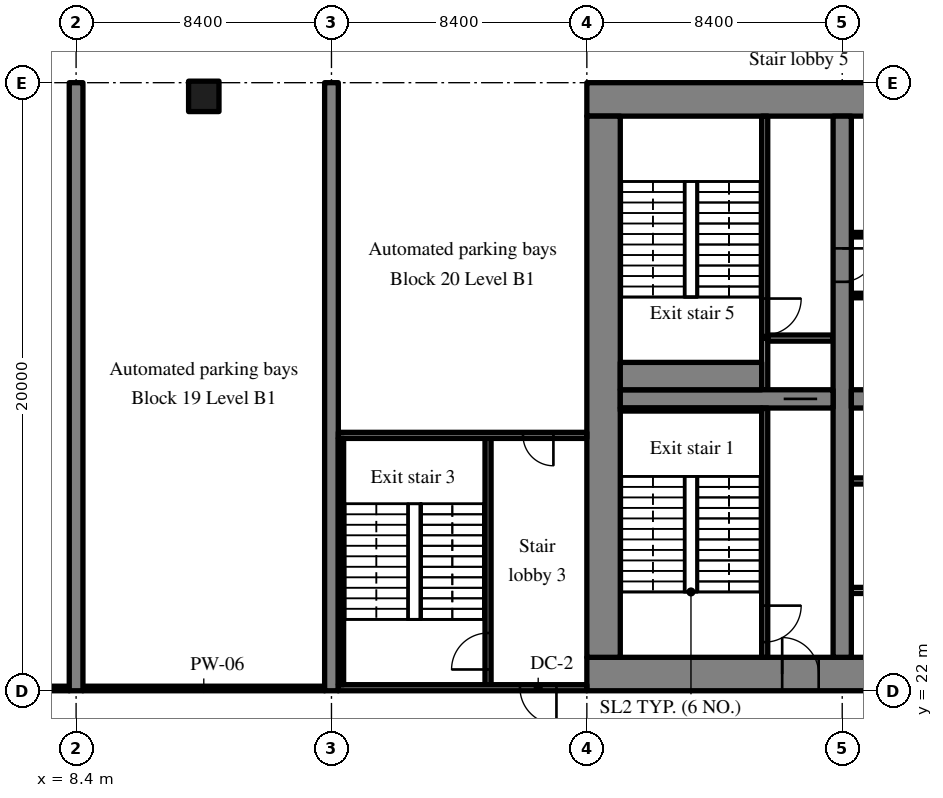
"""IFC4 building model, lengths in metres.
Left out: names, types, materials, properties, quantities, classifications, styles, units other than length and angle.
Written with IfcOpenShell. Run it as: python <this file> out.ifc"""

import sys

from ifc_helpers import new_model, si_unit, direction, frame, frame_2d, origin, origin_2d, place, context, subcontext, project, spatial, rectangle, extrude, source, transform, mapped, element, fill, save


model = new_model("IFC4")
c1 = context("Model", 3, precision=1e-05, world=origin(), true_north=direction((0.0, 1.0)))
c2 = subcontext(c1, "Body", "Model", "MODEL_VIEW")
j1 = project(units=[si_unit("LENGTHUNIT", "METRE"), si_unit("PLANEANGLEUNIT", "RADIAN")], contexts=[c1])
p1 = place(None, origin())
s1 = spatial("IfcSite", under=j1, at=p1, CompositionType="ELEMENT")
p2 = place(p1, origin())
s2 = spatial("IfcBuilding", under=s1, at=p2, CompositionType="ELEMENT")
p3 = place(p2, frame((0.0, 0.0, -4.5)))
s3 = spatial("IfcBuildingStorey", under=s2, at=p3, CompositionType="ELEMENT", Elevation=-4.5)
m1 = source(origin(), c2, "Body", "SweptSolid", [
    extrude(rectangle(XDim=50.4, YDim=1.1, at=frame_2d((25.2, 0.0))), origin(), (0.0, 0.0, 1.0), 4.22),
])
p4 = place(p3, frame((25.2, 22.55, 0.0), z_axis=(0.0, 0.0, 1.0), x_axis=(1.0, 0.0, 0.0)))
e1 = element("IfcWall", 1, at=p4, inside=s3, PredefinedType="SHEAR", context=c2, shape_type="MappedRepresentation", body=[
    mapped(m1, transform((0.0, 0.0, 0.0), scale=1.0)),
])
m2 = source(origin(), c2, "Body", "SweptSolid", [
    extrude(rectangle(XDim=1.8, YDim=2.1, at=frame_2d((0.9, 1.05))), frame((0.0, 0.56, 0.0), z_axis=(0.0, -1.0, 0.0), x_axis=(1.0, 0.0, 0.0)), (0.0, 0.0, 1.0), 1.12),
])
p5 = place(p4, frame((15.9, 0.0, 0.0)))
e2 = element("IfcOpeningElement", 2, at=p5, cuts=e1, PredefinedType="OPENING", context=c2, shape_type="MappedRepresentation", body=[
    mapped(m2, transform((0.0, 0.0, 0.0), scale=1.0)),
])
m3 = source(origin(), c2, "Body", "SweptSolid", [
    extrude(rectangle(XDim=1.2, YDim=2.1, at=frame_2d((0.6, 1.05))), frame((0.0, 0.56, 0.0), z_axis=(0.0, -1.0, 0.0), x_axis=(1.0, 0.0, 0.0)), (0.0, 0.0, 1.0), 1.12),
])
p6 = place(p4, frame((27.0, 0.0, 0.0)))
e3 = element("IfcOpeningElement", 3, at=p6, cuts=e1, PredefinedType="OPENING", context=c2, shape_type="MappedRepresentation", body=[
    mapped(m3, transform((0.0, 0.0, 0.0), scale=1.0)),
])
m4 = source(origin(), c2, "Body", "SweptSolid", [
    extrude(rectangle(XDim=0.9, YDim=2.1, at=frame_2d((0.45, 1.05))), frame((0.0, 0.56, 0.0), z_axis=(0.0, -1.0, 0.0), x_axis=(1.0, 0.0, 0.0)), (0.0, 0.0, 1.0), 1.12),
])
p7 = place(p4, frame((34.5, 0.0, 0.0)))
e4 = element("IfcOpeningElement", 4, at=p7, cuts=e1, PredefinedType="OPENING", context=c2, shape_type="MappedRepresentation", body=[
    mapped(m4, transform((0.0, 0.0, 0.0), scale=1.0)),
])
p8 = place(p4, frame((31.5, 0.0, 0.0)))
e5 = element("IfcOpeningElement", 5, at=p8, cuts=e1, PredefinedType="OPENING", context=c2, shape_type="MappedRepresentation", body=[
    mapped(m4, transform((0.0, 0.0, 0.0), scale=1.0)),
])
p9 = place(p4, frame((39.75, 0.0, 0.0)))
e6 = element("IfcOpeningElement", 6, at=p9, cuts=e1, PredefinedType="OPENING", context=c2, shape_type="MappedRepresentation", body=[
    mapped(m4, transform((0.0, 0.0, 0.0), scale=1.0)),
])
p10 = place(p4, frame((36.75, 0.0, 0.0)))
e7 = element("IfcOpeningElement", 7, at=p10, cuts=e1, PredefinedType="OPENING", context=c2, shape_type="MappedRepresentation", body=[
    mapped(m4, transform((0.0, 0.0, 0.0), scale=1.0)),
])
p11 = place(p4, frame((6.425, 0.0, 0.0)))
e8 = element("IfcOpeningElement", 8, at=p11, cuts=e1, PredefinedType="OPENING", context=c2, shape_type="MappedRepresentation", body=[
    mapped(m3, transform((0.0, 0.0, 0.0), scale=1.0)),
])
p12 = place(p4, frame((47.675, 0.0, 0.0)))
e9 = element("IfcOpeningElement", 9, at=p12, cuts=e1, PredefinedType="OPENING", context=c2, shape_type="MappedRepresentation", body=[
    mapped(m3, transform((0.0, 0.0, 0.0), scale=1.0)),
])
p13 = place(p3, frame((25.2, 41.45, 0.0), z_axis=(0.0, 0.0, 1.0), x_axis=(1.0, 0.0, 0.0)))
e10 = element("IfcWall", 10, at=p13, inside=s3, PredefinedType="SHEAR", context=c2, shape_type="MappedRepresentation", body=[
    mapped(m1, transform((0.0, 0.0, 0.0), scale=1.0)),
])
m5 = source(origin(), c2, "Body", "SweptSolid", [
    extrude(rectangle(XDim=17.8, YDim=1.1, at=frame_2d((8.9, 0.0))), origin(), (0.0, 0.0, 1.0), 4.22),
])
p14 = place(p3, frame((25.75, 23.1, 0.0), z_axis=(0.0, 0.0, 1.0), x_axis=(0.0, 1.0, 0.0)))
e11 = element("IfcWall", 11, at=p14, inside=s3, PredefinedType="SHEAR", context=c2, shape_type="MappedRepresentation", body=[
    mapped(m5, transform((0.0, 0.0, 0.0), scale=1.0)),
])
m6 = source(origin(), c2, "Body", "SweptSolid", [
    extrude(rectangle(XDim=17.8, YDim=0.6, at=frame_2d((8.9, 0.0))), origin(), (0.0, 0.0, 1.0), 4.22),
])
p15 = place(p3, frame((33.6, 23.1, 0.0), z_axis=(0.0, 0.0, 1.0), x_axis=(0.0, 1.0, 0.0)))
e12 = element("IfcWall", 12, at=p15, inside=s3, PredefinedType="SHEAR", context=c2, shape_type="MappedRepresentation", body=[
    mapped(m6, transform((0.0, 0.0, 0.0), scale=1.0)),
])
m7 = source(origin(), c2, "Body", "SweptSolid", [
    extrude(rectangle(XDim=1.1, YDim=2.1, at=frame_2d((0.55, 1.05))), frame((0.0, 0.31, 0.0), z_axis=(0.0, -1.0, 0.0), x_axis=(1.0, 0.0, 0.0)), (0.0, 0.0, 1.0), 0.62),
])
p16 = place(p15, frame((12.35, 0.0, 0.0)))
e13 = element("IfcOpeningElement", 13, at=p16, cuts=e12, PredefinedType="OPENING", context=c2, shape_type="MappedRepresentation", body=[
    mapped(m7, transform((0.0, 0.0, 0.0), scale=1.0)),
])
m8 = source(origin(), c2, "Body", "SweptSolid", [
    extrude(rectangle(XDim=7.0, YDim=0.6, at=frame_2d((3.5, 0.0))), origin(), (0.0, 0.0, 1.0), 4.22),
])
p17 = place(p3, frame((26.3, 31.6, 0.0), z_axis=(0.0, 0.0, 1.0), x_axis=(1.0, 0.0, 0.0)))
e14 = element("IfcWall", 14, at=p17, inside=s3, PredefinedType="SHEAR", context=c2, shape_type="MappedRepresentation", body=[
    mapped(m8, transform((0.0, 0.0, 0.0), scale=1.0)),
])
p18 = place(p17, frame((5.375, 0.0, 0.0)))
e15 = element("IfcOpeningElement", 15, at=p18, cuts=e14, PredefinedType="OPENING", context=c2, shape_type="MappedRepresentation", body=[
    mapped(m7, transform((0.0, 0.0, 0.0), scale=1.0)),
])
m9 = source(origin(), c2, "Body", "SweptSolid", [
    extrude(rectangle(XDim=16.2, YDim=0.6, at=frame_2d((8.1, 0.0))), origin(), (0.0, 0.0, 1.0), 4.22),
])
p19 = place(p3, frame((33.9, 31.6, 0.0), z_axis=(0.0, 0.0, 1.0), x_axis=(1.0, 0.0, 0.0)))
e16 = element("IfcWall", 16, at=p19, inside=s3, PredefinedType="SHEAR", context=c2, shape_type="MappedRepresentation", body=[
    mapped(m9, transform((0.0, 0.0, 0.0), scale=1.0)),
])
m10 = source(origin(), c2, "Body", "SweptSolid", [
    extrude(rectangle(XDim=1.0, YDim=2.1, at=frame_2d((0.5, 1.05))), frame((0.0, 0.31, 0.0), z_axis=(0.0, -1.0, 0.0), x_axis=(1.0, 0.0, 0.0)), (0.0, 0.0, 1.0), 0.62),
])
p20 = place(p19, frame((14.65, 0.0, 0.0)))
e17 = element("IfcOpeningElement", 17, at=p20, cuts=e16, PredefinedType="OPENING", context=c2, shape_type="MappedRepresentation", body=[
    mapped(m10, transform((0.0, 0.0, 0.0), scale=1.0)),
])
m11 = source(origin(), c2, "Body", "SweptSolid", [
    extrude(rectangle(XDim=20.0, YDim=0.45, at=frame_2d((10.0, 0.0))), origin(), (0.0, 0.0, 1.0), 4.22),
])
for number, where, z_axis, x_axis in (
    (18, (8.4, 22.0, 0.0), (0.0, 0.0, 1.0), (0.0, 1.0, 0.0)),
    (19, (16.8, 22.0, 0.0), (0.0, 0.0, 1.0), (0.0, 1.0, 0.0)),
):
    element("IfcWall", number, at=place(p3, frame(where, z_axis=z_axis, x_axis=x_axis)), inside=s3, PredefinedType="SHEAR", context=c2, shape_type="MappedRepresentation", body=[
        mapped(m11, transform((0.0, 0.0, 0.0), scale=1.0)),
    ])
m12 = source(origin(), c2, "Body", "SweptSolid", [
    extrude(rectangle(XDim=1.0, YDim=1.0, at=origin_2d()), origin(), (0.0, 0.0, 1.0), 4.22),
])
p21 = place(p3, frame((12.6, 41.55, 0.0), z_axis=(0.0, 0.0, 1.0), x_axis=(1.0, 0.0, 0.0)))
e20 = element("IfcColumn", 20, at=p21, inside=s3, PredefinedType="COLUMN", context=c2, shape_type="MappedRepresentation", body=[
    mapped(m12, transform((0.0, 0.0, 0.0), scale=1.0)),
])
m13 = source(origin(), c2, "Body", "SweptSolid", [
    extrude(rectangle(XDim=6.0, YDim=0.2, at=frame_2d((3.0, 0.0))), origin(), (0.0, 0.0, 1.0), 4.22),
])
p22 = place(p3, frame((33.9, 25.3, 0.0), z_axis=(0.0, 0.0, 1.0), x_axis=(1.0, 0.0, 0.0)))
e21 = element("IfcWall", 21, at=p22, inside=s3, PredefinedType="SOLIDWALL", context=c2, shape_type="MappedRepresentation", body=[
    mapped(m13, transform((0.0, 0.0, 0.0), scale=1.0)),
])
m14 = source(origin(), c2, "Body", "SweptSolid", [
    extrude(rectangle(XDim=1.1, YDim=2.1, at=frame_2d((0.55, 1.05))), frame((0.0, 0.11, 0.0), z_axis=(0.0, -1.0, 0.0), x_axis=(1.0, 0.0, 0.0)), (0.0, 0.0, 1.0), 0.22),
])
p23 = place(p22, frame((0.95, 0.0, 0.0)))
e22 = element("IfcOpeningElement", 22, at=p23, cuts=e21, PredefinedType="OPENING", context=c2, shape_type="MappedRepresentation", body=[
    mapped(m14, transform((0.0, 0.0, 0.0), scale=1.0)),
])
p24 = place(p22, frame((3.95, 0.0, 0.0)))
e23 = element("IfcOpeningElement", 23, at=p24, cuts=e21, PredefinedType="OPENING", context=c2, shape_type="MappedRepresentation", body=[
    mapped(m14, transform((0.0, 0.0, 0.0), scale=1.0)),
])
m15 = source(origin(), c2, "Body", "SweptSolid", [
    extrude(rectangle(XDim=12.0, YDim=0.2, at=frame_2d((6.0, 0.0))), origin(), (0.0, 0.0, 1.0), 4.22),
])
p25 = place(p3, frame((33.9, 28.9, 0.0), z_axis=(0.0, 0.0, 1.0), x_axis=(1.0, 0.0, 0.0)))
e24 = element("IfcWall", 24, at=p25, inside=s3, PredefinedType="SOLIDWALL", context=c2, shape_type="MappedRepresentation", body=[
    mapped(m15, transform((0.0, 0.0, 0.0), scale=1.0)),
])
p26 = place(p25, frame((6.95, 0.0, 0.0)))
e25 = element("IfcOpeningElement", 25, at=p26, cuts=e24, PredefinedType="OPENING", context=c2, shape_type="MappedRepresentation", body=[
    mapped(m14, transform((0.0, 0.0, 0.0), scale=1.0)),
])
p27 = place(p25, frame((9.95, 0.0, 0.0)))
e26 = element("IfcOpeningElement", 26, at=p27, cuts=e24, PredefinedType="OPENING", context=c2, shape_type="MappedRepresentation", body=[
    mapped(m14, transform((0.0, 0.0, 0.0), scale=1.0)),
])
m16 = source(origin(), c2, "Body", "SweptSolid", [
    extrude(rectangle(XDim=14.1, YDim=0.15, at=frame_2d((7.05, 0.0))), origin(), (0.0, 0.0, 1.0), 4.22),
])
p28 = place(p3, frame((33.9, 35.0, 0.0), z_axis=(0.0, 0.0, 1.0), x_axis=(1.0, 0.0, 0.0)))
e27 = element("IfcWall", 27, at=p28, inside=s3, PredefinedType="PARTITIONING", context=c2, shape_type="MappedRepresentation", body=[
    mapped(m16, transform((0.0, 0.0, 0.0), scale=1.0)),
])
m17 = source(origin(), c2, "Body", "SweptSolid", [
    extrude(rectangle(XDim=0.9, YDim=2.1, at=frame_2d((0.45, 1.05))), frame((0.0, 0.085, 0.0), z_axis=(0.0, -1.0, 0.0), x_axis=(1.0, 0.0, 0.0)), (0.0, 0.0, 1.0), 0.17),
])
p29 = place(p28, frame((2.004, 0.0, 0.0)))
e28 = element("IfcOpeningElement", 28, at=p29, cuts=e27, PredefinedType="OPENING", context=c2, shape_type="MappedRepresentation", body=[
    mapped(m17, transform((0.0, 0.0, 0.0), scale=1.0)),
])
p30 = place(p28, frame((9.017, 0.0, 0.0)))
e29 = element("IfcOpeningElement", 29, at=p30, cuts=e27, PredefinedType="OPENING", context=c2, shape_type="MappedRepresentation", body=[
    mapped(m17, transform((0.0, 0.0, 0.0), scale=1.0)),
])
m18 = source(origin(), c2, "Body", "SweptSolid", [
    extrude(rectangle(XDim=16.2, YDim=0.15, at=frame_2d((8.1, 0.0))), origin(), (0.0, 0.0, 1.0), 4.22),
])
p31 = place(p3, frame((33.9, 37.0, 0.0), z_axis=(0.0, 0.0, 1.0), x_axis=(1.0, 0.0, 0.0)))
e30 = element("IfcWall", 30, at=p31, inside=s3, PredefinedType="PARTITIONING", context=c2, shape_type="MappedRepresentation", body=[
    mapped(m18, transform((0.0, 0.0, 0.0), scale=1.0)),
])
p32 = place(p31, frame((3.195, 0.0, 0.0)))
e31 = element("IfcOpeningElement", 31, at=p32, cuts=e30, PredefinedType="OPENING", context=c2, shape_type="MappedRepresentation", body=[
    mapped(m17, transform((0.0, 0.0, 0.0), scale=1.0)),
])
p33 = place(p31, frame((8.055, 0.0, 0.0)))
e32 = element("IfcOpeningElement", 32, at=p33, cuts=e30, PredefinedType="OPENING", context=c2, shape_type="MappedRepresentation", body=[
    mapped(m17, transform((0.0, 0.0, 0.0), scale=1.0)),
])
p34 = place(p31, frame((11.295, 0.0, 0.0)))
e33 = element("IfcOpeningElement", 33, at=p34, cuts=e30, PredefinedType="OPENING", context=c2, shape_type="MappedRepresentation", body=[
    mapped(m17, transform((0.0, 0.0, 0.0), scale=1.0)),
])
p35 = place(p31, frame((14.535, 0.0, 0.0)))
e34 = element("IfcOpeningElement", 34, at=p35, cuts=e30, PredefinedType="OPENING", context=c2, shape_type="MappedRepresentation", body=[
    mapped(m17, transform((0.0, 0.0, 0.0), scale=1.0)),
])
m19 = source(origin(), c2, "Body", "SweptSolid", [
    extrude(rectangle(XDim=8.2, YDim=0.2, at=frame_2d((4.1, 0.0))), origin(), (0.0, 0.0, 1.0), 4.22),
])
p36 = place(p3, frame((31.05, 23.1, 0.0), z_axis=(0.0, 0.0, 1.0), x_axis=(0.0, 1.0, 0.0)))
e35 = element("IfcWall", 35, at=p36, inside=s3, PredefinedType="SOLIDWALL", context=c2, shape_type="MappedRepresentation", body=[
    mapped(m19, transform((0.0, 0.0, 0.0), scale=1.0)),
])
m20 = source(origin(), c2, "Body", "SweptSolid", [
    extrude(rectangle(XDim=1.2, YDim=2.1, at=frame_2d((0.6, 1.05))), frame((0.0, 0.11, 0.0), z_axis=(0.0, -1.0, 0.0), x_axis=(1.0, 0.0, 0.0)), (0.0, 0.0, 1.0), 0.22),
])
p37 = place(p36, frame((0.5, 0.0, 0.0)))
e36 = element("IfcOpeningElement", 36, at=p37, cuts=e35, PredefinedType="OPENING", context=c2, shape_type="MappedRepresentation", body=[
    mapped(m20, transform((0.0, 0.0, 0.0), scale=1.0)),
])
m21 = source(origin(), c2, "Body", "SweptSolid", [
    extrude(rectangle(XDim=1.7, YDim=0.2, at=frame_2d((0.85, 0.0))), origin(), (0.0, 0.0, 1.0), 4.22),
])
p38 = place(p3, frame((31.05, 31.9, 0.0), z_axis=(0.0, 0.0, 1.0), x_axis=(0.0, 1.0, 0.0)))
e37 = element("IfcWall", 37, at=p38, inside=s3, PredefinedType="SOLIDWALL", context=c2, shape_type="MappedRepresentation", body=[
    mapped(m21, transform((0.0, 0.0, 0.0), scale=1.0)),
])
m22 = source(origin(), c2, "Body", "SweptSolid", [
    extrude(rectangle(XDim=2.15, YDim=0.2, at=frame_2d((1.075, 0.0))), origin(), (0.0, 0.0, 1.0), 4.22),
])
p39 = place(p3, frame((31.15, 33.6, 0.0), z_axis=(0.0, 0.0, 1.0), x_axis=(1.0, 0.0, 0.0)))
e38 = element("IfcWall", 38, at=p39, inside=s3, PredefinedType="SOLIDWALL", context=c2, shape_type="MappedRepresentation", body=[
    mapped(m22, transform((0.0, 0.0, 0.0), scale=1.0)),
])
m23 = source(origin(), c2, "Body", "SweptSolid", [
    extrude(rectangle(XDim=7.3, YDim=0.2, at=frame_2d((3.65, 0.0))), origin(), (0.0, 0.0, 1.0), 4.22),
])
p40 = place(p3, frame((31.05, 33.6, 0.0), z_axis=(0.0, 0.0, 1.0), x_axis=(0.0, 1.0, 0.0)))
e39 = element("IfcWall", 39, at=p40, inside=s3, PredefinedType="SOLIDWALL", context=c2, shape_type="MappedRepresentation", body=[
    mapped(m23, transform((0.0, 0.0, 0.0), scale=1.0)),
])
p41 = place(p40, frame((0.1, 0.0, 0.0)))
e40 = element("IfcOpeningElement", 40, at=p41, cuts=e39, PredefinedType="OPENING", context=c2, shape_type="MappedRepresentation", body=[
    mapped(m20, transform((0.0, 0.0, 0.0), scale=1.0)),
])
m24 = source(origin(), c2, "Body", "SweptSolid", [
    extrude(rectangle(XDim=8.3, YDim=0.2, at=frame_2d((4.15, 0.0))), origin(), (0.0, 0.0, 1.0), 4.22),
])
p42 = place(p3, frame((21.95, 22.1, 0.0), z_axis=(0.0, 0.0, 1.0), x_axis=(0.0, 1.0, 0.0)))
e41 = element("IfcWall", 41, at=p42, inside=s3, PredefinedType="SOLIDWALL", context=c2, shape_type="MappedRepresentation", body=[
    mapped(m24, transform((0.0, 0.0, 0.0), scale=1.0)),
])
p43 = place(p42, frame((0.6, 0.0, 0.0)))
e42 = element("IfcOpeningElement", 42, at=p43, cuts=e41, PredefinedType="OPENING", context=c2, shape_type="MappedRepresentation", body=[
    mapped(m20, transform((0.0, 0.0, 0.0), scale=1.0)),
])
m25 = source(origin(), c2, "Body", "SweptSolid", [
    extrude(rectangle(XDim=8.175, YDim=0.2, at=frame_2d((4.087, 0.0))), origin(), (0.0, 0.0, 1.0), 4.22),
])
p44 = place(p3, frame((17.025, 22.1, 0.0), z_axis=(0.0, 0.0, 1.0), x_axis=(1.0, 0.0, 0.0)))
e43 = element("IfcWall", 43, at=p44, inside=s3, PredefinedType="SOLIDWALL", context=c2, shape_type="MappedRepresentation", body=[
    mapped(m25, transform((0.0, 0.0, 0.0), scale=1.0)),
])
p45 = place(p44, frame((5.975, 0.0, 0.0)))
e44 = element("IfcOpeningElement", 44, at=p45, cuts=e43, PredefinedType="OPENING", context=c2, shape_type="MappedRepresentation", body=[
    mapped(m20, transform((0.0, 0.0, 0.0), scale=1.0)),
])
p46 = place(p3, frame((17.025, 30.4, 0.0), z_axis=(0.0, 0.0, 1.0), x_axis=(1.0, 0.0, 0.0)))
e45 = element("IfcWall", 45, at=p46, inside=s3, PredefinedType="SOLIDWALL", context=c2, shape_type="MappedRepresentation", body=[
    mapped(m25, transform((0.0, 0.0, 0.0), scale=1.0)),
])
m26 = source(origin(), c2, "Body", "SweptSolid", [
    extrude(rectangle(XDim=1.0, YDim=2.1, at=frame_2d((0.5, 1.05))), frame((0.0, 0.11, 0.0), z_axis=(0.0, -1.0, 0.0), x_axis=(1.0, 0.0, 0.0)), (0.0, 0.0, 1.0), 0.22),
])
p47 = place(p46, frame((6.075, 0.0, 0.0)))
e46 = element("IfcOpeningElement", 46, at=p47, cuts=e45, PredefinedType="OPENING", context=c2, shape_type="MappedRepresentation", body=[
    mapped(m26, transform((0.0, 0.0, 0.0), scale=1.0)),
])
m27 = source(origin(), c2, "Body", "SweptSolid", [
    extrude(rectangle(XDim=4.65, YDim=0.1, at=frame_2d((2.325, 0.0))), origin(), (0.0, 0.0, 1.0), 4.22),
])
p48 = place(p3, frame((26.3, 31.25, 0.0), z_axis=(0.0, 0.0, 1.0), x_axis=(1.0, 0.0, 0.0)))
e47 = element("IfcWall", 47, at=p48, inside=s3, PredefinedType="SOLIDWALL", context=c2, shape_type="MappedRepresentation", body=[
    mapped(m27, transform((0.0, 0.0, 0.0), scale=1.0)),
])
m28 = source(origin(), c2, "Body", "SweptSolid", [
    extrude(rectangle(XDim=8.1, YDim=0.175, at=frame_2d((4.05, 0.0))), origin(), (0.0, 0.0, 1.0), 4.22),
])
p49 = place(p3, frame((17.112, 22.2, 0.0), z_axis=(0.0, 0.0, 1.0), x_axis=(0.0, 1.0, 0.0)))
e48 = element("IfcWall", 48, at=p49, inside=s3, PredefinedType="SOLIDWALL", context=c2, shape_type="MappedRepresentation", body=[
    mapped(m28, transform((0.0, 0.0, 0.0), scale=1.0)),
])
m29 = source(origin(), c2, "Body", "SweptSolid", [
    extrude(rectangle(XDim=4.65, YDim=0.9, at=frame_2d((2.325, 0.0))), origin(), (0.0, 0.0, 1.0), 4.22),
])
p50 = place(p3, frame((26.3, 32.35, 0.0), z_axis=(0.0, 0.0, 1.0), x_axis=(1.0, 0.0, 0.0)))
e49 = element("IfcWall", 49, at=p50, inside=s3, PredefinedType="SOLIDWALL", context=c2, shape_type="MappedRepresentation", body=[
    mapped(m29, transform((0.0, 0.0, 0.0), scale=1.0)),
])
m30 = source(origin(), c2, "Body", "SweptSolid", [
    extrude(rectangle(XDim=7.725, YDim=0.15, at=frame_2d((3.863, 0.0))), origin(), (0.0, 0.0, 1.0), 4.22),
])
p51 = place(p3, frame((0.45, 22.075, 0.0), z_axis=(0.0, 0.0, 1.0), x_axis=(1.0, 0.0, 0.0)))
e50 = element("IfcWall", 50, at=p51, inside=s3, PredefinedType="PARTITIONING", context=c2, shape_type="MappedRepresentation", body=[
    mapped(m30, transform((0.0, 0.0, 0.0), scale=1.0)),
])
m31 = source(origin(), c2, "Body", "SweptSolid", [
    extrude(rectangle(XDim=7.95, YDim=0.15, at=frame_2d((3.975, 0.0))), origin(), (0.0, 0.0, 1.0), 4.22),
])
p52 = place(p3, frame((8.625, 22.075, 0.0), z_axis=(0.0, 0.0, 1.0), x_axis=(1.0, 0.0, 0.0)))
e51 = element("IfcWall", 51, at=p52, inside=s3, PredefinedType="PARTITIONING", context=c2, shape_type="MappedRepresentation", body=[
    mapped(m31, transform((0.0, 0.0, 0.0), scale=1.0)),
])
m32 = source(origin(), c2, "Body", "SweptSolid", [
    extrude(rectangle(XDim=1.2, YDim=2.1, at=frame_2d((0.6, 1.05))), frame((0.0, 0.025, 0.0), z_axis=(0.0, -1.0, 0.0), x_axis=(1.0, 0.0, 0.0)), (0.0, 0.0, 1.0), 0.05),
])
p53 = place(p37, origin())
e52 = element("IfcDoor", 52, at=p53, inside=s3, OperationType="SINGLE_SWING_RIGHT", PredefinedType="DOOR", context=c2, shape_type="MappedRepresentation", body=[
    mapped(m32, transform((0.0, 0.0, 0.0), scale=1.0)),
])
fill(e36, e52)
m33 = source(origin(), c2, "Body", "SweptSolid", [
    extrude(rectangle(XDim=1.2, YDim=2.1, at=frame_2d((0.6, 1.05))), frame((0.0, 0.325, 0.0), z_axis=(0.0, -1.0, 0.0), x_axis=(1.0, 0.0, 0.0)), (0.0, 0.0, 1.0), 0.05),
])
p54 = place(p11, origin())
e53 = element("IfcDoor", 53, at=p54, inside=s3, OperationType="SINGLE_SWING_LEFT", PredefinedType="DOOR", context=c2, shape_type="MappedRepresentation", body=[
    mapped(m33, transform((0.0, 0.0, 0.0), scale=1.0)),
])
fill(e8, e53)
m34 = source(origin(), c2, "Body", "SweptSolid", [
    extrude(rectangle(XDim=1.1, YDim=2.1, at=frame_2d((0.55, 1.05))), frame((0.0, 0.025, 0.0), z_axis=(0.0, -1.0, 0.0), x_axis=(1.0, 0.0, 0.0)), (0.0, 0.0, 1.0), 0.05),
])
p55 = place(p18, origin())
e54 = element("IfcDoor", 54, at=p55, inside=s3, OperationType="SLIDING_TO_RIGHT", PredefinedType="DOOR", context=c2, shape_type="MappedRepresentation", body=[
    mapped(m34, transform((0.0, 0.0, 0.0), scale=1.0)),
])
fill(e15, e54)
p56 = place(p41, origin())
e55 = element("IfcDoor", 55, at=p56, inside=s3, OperationType="SINGLE_SWING_RIGHT", PredefinedType="DOOR", context=c2, shape_type="MappedRepresentation", body=[
    mapped(m32, transform((0.0, 0.0, 0.0), scale=1.0)),
])
fill(e40, e55)
p57 = place(p43, origin())
e56 = element("IfcDoor", 56, at=p57, inside=s3, OperationType="SINGLE_SWING_LEFT", PredefinedType="DOOR", context=c2, shape_type="MappedRepresentation", body=[
    mapped(m32, transform((0.0, 0.0, 0.0), scale=1.0)),
])
fill(e42, e56)
p58 = place(p45, origin())
e57 = element("IfcDoor", 57, at=p58, inside=s3, OperationType="SINGLE_SWING_RIGHT", PredefinedType="DOOR", context=c2, shape_type="MappedRepresentation", body=[
    mapped(m32, transform((0.0, 0.0, 0.0), scale=1.0)),
])
fill(e44, e57)
m35 = source(origin(), c2, "Body", "SweptSolid", [
    extrude(rectangle(XDim=1.0, YDim=2.1, at=frame_2d((0.5, 1.05))), frame((0.0, 0.025, 0.0), z_axis=(0.0, -1.0, 0.0), x_axis=(1.0, 0.0, 0.0)), (0.0, 0.0, 1.0), 0.05),
])
p59 = place(p47, origin())
e58 = element("IfcDoor", 58, at=p59, inside=s3, OperationType="SINGLE_SWING_RIGHT", PredefinedType="DOOR", context=c2, shape_type="MappedRepresentation", body=[
    mapped(m35, transform((0.0, 0.0, 0.0), scale=1.0)),
])
fill(e46, e58)
p60 = place(p16, origin())
e59 = element("IfcDoor", 59, at=p60, inside=s3, OperationType="SINGLE_SWING_RIGHT", PredefinedType="DOOR", context=c2, shape_type="MappedRepresentation", body=[
    mapped(m34, transform((0.0, 0.0, 0.0), scale=1.0)),
])
fill(e13, e59)
save(model, sys.argv[1])
